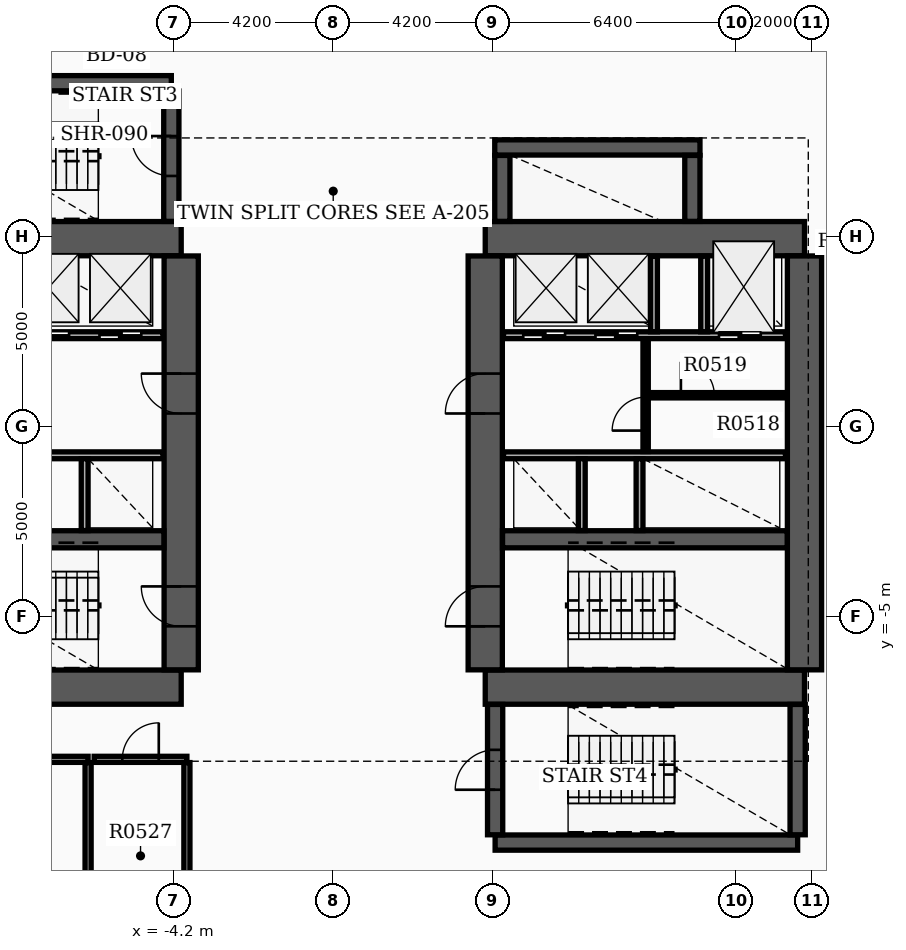
"""IFC4 building model, lengths in metres.
Left out: names, types, materials, properties, quantities, classifications, styles, units other than length and angle.
Written with IfcOpenShell. Run it as: python <this file> out.ifc"""

import sys

from ifc_helpers import new_model, si_unit, direction, frame, frame_2d, origin, place, context, subcontext, project, spatial, rectangle, extrude, element, fill, save


model = new_model("IFC4")
c1 = context("Model", 3, precision=1e-05, world=origin(), true_north=direction((0.0, 1.0)))
c2 = subcontext(c1, "Body", "Model", "MODEL_VIEW")
j1 = project(units=[si_unit("LENGTHUNIT", "METRE"), si_unit("PLANEANGLEUNIT", "RADIAN")], contexts=[c1])
p1 = place(None, origin())
s1 = spatial("IfcSite", under=j1, at=p1, CompositionType="ELEMENT")
p2 = place(p1, origin())
s2 = spatial("IfcBuilding", under=s1, at=p2, CompositionType="ELEMENT")
p3 = place(p2, frame((0.0, 0.0, 35.4)))
s3 = spatial("IfcBuildingStorey", under=s2, at=p3, CompositionType="ELEMENT", Elevation=35.4)
for number, where, z_axis, x_axis in (
    (1, (-12.4, -6.85, 0.0), (0.0, 0.0, 1.0), (1.0, 0.0, 0.0)),
    (2, (-12.4, 4.95, 0.0), (0.0, 0.0, 1.0), (1.0, 0.0, 0.0)),
):
    element("IfcWall", number, at=place(p3, frame(where, z_axis=z_axis, x_axis=x_axis)), inside=s3, PredefinedType="SHEAR", context=c2, shape_type="SweptSolid", body=[
        extrude(rectangle(XDim=8.4, YDim=0.9, at=frame_2d((4.2, 0.0))), origin(), (0.0, 0.0, 1.0), 3.7),
    ])
p4 = place(p3, frame((-4.0, -6.395, 0.0), z_axis=(0.0, 0.0, 1.0), x_axis=(0.0, 1.0, 0.0)))
e3 = element("IfcWall", 3, at=p4, inside=s3, PredefinedType="SHEAR", context=c2, shape_type="SweptSolid", body=[
    extrude(rectangle(XDim=10.89, YDim=0.9, at=frame_2d((5.445, 0.0))), origin(), (0.0, 0.0, 1.0), 3.7),
])
p5 = place(p4, frame((1.145, 0.0, 0.0)))
e4 = element("IfcOpeningElement", 4, at=p5, cuts=e3, PredefinedType="OPENING", context=c2, shape_type="SweptSolid", body=[
    extrude(rectangle(XDim=1.05, YDim=2.15, at=frame_2d((0.525, 1.075))), frame((0.0, 0.46, 0.0), z_axis=(0.0, -1.0, 0.0), x_axis=(1.0, 0.0, 0.0)), (0.0, 0.0, 1.0), 0.92),
])
p6 = place(p4, frame((6.745, 0.0, 0.0)))
e5 = element("IfcOpeningElement", 5, at=p6, cuts=e3, PredefinedType="OPENING", context=c2, shape_type="SweptSolid", body=[
    extrude(rectangle(XDim=1.05, YDim=2.15, at=frame_2d((0.525, 1.075))), frame((0.0, 0.46, 0.0), z_axis=(0.0, -1.0, 0.0), x_axis=(1.0, 0.0, 0.0)), (0.0, 0.0, 1.0), 0.92),
])
p7 = place(p3, frame((-11.945, -2.96, 0.0), z_axis=(0.0, 0.0, 1.0), x_axis=(1.0, 0.0, 0.0)))
e6 = element("IfcWall", 6, at=p7, inside=s3, PredefinedType="SHEAR", context=c2, shape_type="SweptSolid", body=[
    extrude(rectangle(XDim=7.49, YDim=0.45, at=frame_2d((3.745, 0.0))), origin(), (0.0, 0.0, 1.0), 3.7),
])
for number, where, z_axis, x_axis in (
    (7, (4.0, -6.85, 0.0), (0.0, 0.0, 1.0), (1.0, 0.0, 0.0)),
    (8, (4.0, 4.95, 0.0), (0.0, 0.0, 1.0), (1.0, 0.0, 0.0)),
):
    element("IfcWall", number, at=place(p3, frame(where, z_axis=z_axis, x_axis=x_axis)), inside=s3, PredefinedType="SHEAR", context=c2, shape_type="SweptSolid", body=[
        extrude(rectangle(XDim=8.4, YDim=0.9, at=frame_2d((4.2, 0.0))), origin(), (0.0, 0.0, 1.0), 3.7),
    ])
p8 = place(p3, frame((4.0, -6.395, 0.0), z_axis=(0.0, 0.0, 1.0), x_axis=(0.0, 1.0, 0.0)))
e9 = element("IfcWall", 9, at=p8, inside=s3, PredefinedType="SHEAR", context=c2, shape_type="SweptSolid", body=[
    extrude(rectangle(XDim=10.89, YDim=0.9, at=frame_2d((5.445, 0.0))), origin(), (0.0, 0.0, 1.0), 3.7),
])
p9 = place(p8, frame((1.145, 0.0, 0.0)))
e10 = element("IfcOpeningElement", 10, at=p9, cuts=e9, PredefinedType="OPENING", context=c2, shape_type="SweptSolid", body=[
    extrude(rectangle(XDim=1.05, YDim=2.15, at=frame_2d((0.525, 1.075))), frame((0.0, 0.46, 0.0), z_axis=(0.0, -1.0, 0.0), x_axis=(1.0, 0.0, 0.0)), (0.0, 0.0, 1.0), 0.92),
])
p10 = place(p8, frame((6.745, 0.0, 0.0)))
e11 = element("IfcOpeningElement", 11, at=p10, cuts=e9, PredefinedType="OPENING", context=c2, shape_type="SweptSolid", body=[
    extrude(rectangle(XDim=1.05, YDim=2.15, at=frame_2d((0.525, 1.075))), frame((0.0, 0.46, 0.0), z_axis=(0.0, -1.0, 0.0), x_axis=(1.0, 0.0, 0.0)), (0.0, 0.0, 1.0), 0.92),
])
p11 = place(p3, frame((12.4, -6.395, 0.0), z_axis=(0.0, 0.0, 1.0), x_axis=(0.0, 1.0, 0.0)))
e12 = element("IfcWall", 12, at=p11, inside=s3, PredefinedType="SHEAR", context=c2, shape_type="SweptSolid", body=[
    extrude(rectangle(XDim=10.89, YDim=0.9, at=frame_2d((5.445, 0.0))), origin(), (0.0, 0.0, 1.0), 3.7),
])
p12 = place(p3, frame((4.455, -2.96, 0.0), z_axis=(0.0, 0.0, 1.0), x_axis=(1.0, 0.0, 0.0)))
e13 = element("IfcWall", 13, at=p12, inside=s3, PredefinedType="SHEAR", context=c2, shape_type="SweptSolid", body=[
    extrude(rectangle(XDim=7.49, YDim=0.45, at=frame_2d((3.745, 0.0))), origin(), (0.0, 0.0, 1.0), 3.7),
])
p13 = place(p3, frame((-12.22, 9.04, 0.0), z_axis=(0.0, 0.0, 1.0), x_axis=(1.0, 0.0, 0.0)))
e14 = element("IfcWall", 14, at=p13, inside=s3, PredefinedType="SHEAR", context=c2, shape_type="SweptSolid", body=[
    extrude(rectangle(XDim=7.96, YDim=0.4, at=frame_2d((3.98, 0.0))), origin(), (0.0, 0.0, 1.0), 3.7),
])
p14 = place(p3, frame((-4.26, 5.405, 0.0), z_axis=(0.0, 0.0, 1.0), x_axis=(0.0, 1.0, 0.0)))
e15 = element("IfcWall", 15, at=p14, inside=s3, PredefinedType="SHEAR", context=c2, shape_type="SweptSolid", body=[
    extrude(rectangle(XDim=3.43, YDim=0.4, at=frame_2d((1.715, 0.0))), origin(), (0.0, 0.0, 1.0), 3.7),
])
p15 = place(p14, frame((1.195, 0.0, 0.0)))
e16 = element("IfcOpeningElement", 16, at=p15, cuts=e15, PredefinedType="OPENING", context=c2, shape_type="SweptSolid", body=[
    extrude(rectangle(XDim=1.05, YDim=2.15, at=frame_2d((0.525, 1.075))), frame((0.0, 0.21, 0.0), z_axis=(0.0, -1.0, 0.0), x_axis=(1.0, 0.0, 0.0)), (0.0, 0.0, 1.0), 0.42),
])
p16 = place(p3, frame((4.26, -10.94, 0.0), z_axis=(0.0, 0.0, 1.0), x_axis=(1.0, 0.0, 0.0)))
e17 = element("IfcWall", 17, at=p16, inside=s3, PredefinedType="SHEAR", context=c2, shape_type="SweptSolid", body=[
    extrude(rectangle(XDim=7.96, YDim=0.4, at=frame_2d((3.98, 0.0))), origin(), (0.0, 0.0, 1.0), 3.7),
])
p17 = place(p3, frame((4.26, -10.735, 0.0), z_axis=(0.0, 0.0, 1.0), x_axis=(0.0, 1.0, 0.0)))
e18 = element("IfcWall", 18, at=p17, inside=s3, PredefinedType="SHEAR", context=c2, shape_type="SweptSolid", body=[
    extrude(rectangle(XDim=3.43, YDim=0.4, at=frame_2d((1.715, 0.0))), origin(), (0.0, 0.0, 1.0), 3.7),
])
p18 = place(p17, frame((1.185, 0.0, 0.0)))
e19 = element("IfcOpeningElement", 19, at=p18, cuts=e18, PredefinedType="OPENING", context=c2, shape_type="SweptSolid", body=[
    extrude(rectangle(XDim=1.05, YDim=2.15, at=frame_2d((0.525, 1.075))), frame((0.0, 0.21, 0.0), z_axis=(0.0, -1.0, 0.0), x_axis=(1.0, 0.0, 0.0)), (0.0, 0.0, 1.0), 0.42),
])
p19 = place(p3, frame((12.22, -10.735, 0.0), z_axis=(0.0, 0.0, 1.0), x_axis=(0.0, 1.0, 0.0)))
e20 = element("IfcWall", 20, at=p19, inside=s3, PredefinedType="SHEAR", context=c2, shape_type="SweptSolid", body=[
    extrude(rectangle(XDim=3.43, YDim=0.4, at=frame_2d((1.715, 0.0))), origin(), (0.0, 0.0, 1.0), 3.7),
])
p20 = place(p3, frame((4.45, 5.405, 0.0), z_axis=(0.0, 0.0, 1.0), x_axis=(0.0, 1.0, 0.0)))
e21 = element("IfcWall", 21, at=p20, inside=s3, PredefinedType="SHEAR", context=c2, shape_type="SweptSolid", body=[
    extrude(rectangle(XDim=1.735, YDim=0.4, at=frame_2d((0.867, 0.0))), origin(), (0.0, 0.0, 1.0), 3.7),
])
p21 = place(p3, frame((4.25, 7.35, 0.0), z_axis=(0.0, 0.0, 1.0), x_axis=(1.0, 0.0, 0.0)))
e22 = element("IfcWall", 22, at=p21, inside=s3, PredefinedType="SHEAR", context=c2, shape_type="SweptSolid", body=[
    extrude(rectangle(XDim=5.4, YDim=0.4, at=frame_2d((2.7, 0.0))), origin(), (0.0, 0.0, 1.0), 3.7),
])
p22 = place(p3, frame((9.45, 5.405, 0.0), z_axis=(0.0, 0.0, 1.0), x_axis=(0.0, 1.0, 0.0)))
e23 = element("IfcWall", 23, at=p22, inside=s3, PredefinedType="SHEAR", context=c2, shape_type="SweptSolid", body=[
    extrude(rectangle(XDim=1.735, YDim=0.4, at=frame_2d((0.867, 0.0))), origin(), (0.0, 0.0, 1.0), 3.7),
])
p23 = place(p3, frame((-11.9, 2.41, 0.0), z_axis=(0.0, 0.0, 1.0), x_axis=(1.0, 0.0, 0.0)))
e24 = element("IfcWall", 24, at=p23, inside=s3, PredefinedType="SOLIDWALL", context=c2, shape_type="SweptSolid", body=[
    extrude(rectangle(XDim=7.42, YDim=0.18, at=frame_2d((3.71, 0.0))), origin(), (0.0, 0.0, 1.0), 2.9),
])
p24 = place(p23, frame((0.55, 0.0, 0.0)))
e25 = element("IfcOpeningElement", 25, at=p24, cuts=e24, PredefinedType="OPENING", context=c2, shape_type="SweptSolid", body=[
    extrude(rectangle(XDim=1.1, YDim=2.15, at=frame_2d((0.55, 1.075))), frame((0.0, 0.1, 0.0), z_axis=(0.0, -1.0, 0.0), x_axis=(1.0, 0.0, 0.0)), (0.0, 0.0, 1.0), 0.2),
])
p25 = place(p23, frame((3.85, 0.0, 0.0)))
e26 = element("IfcOpeningElement", 26, at=p25, cuts=e24, PredefinedType="OPENING", context=c2, shape_type="SweptSolid", body=[
    extrude(rectangle(XDim=1.1, YDim=2.15, at=frame_2d((0.55, 1.075))), frame((0.0, 0.1, 0.0), z_axis=(0.0, -1.0, 0.0), x_axis=(1.0, 0.0, 0.0)), (0.0, 0.0, 1.0), 0.2),
])
p26 = place(p23, frame((5.75, 0.0, 0.0)))
e27 = element("IfcOpeningElement", 27, at=p26, cuts=e24, PredefinedType="OPENING", context=c2, shape_type="SweptSolid", body=[
    extrude(rectangle(XDim=1.1, YDim=2.15, at=frame_2d((0.55, 1.075))), frame((0.0, 0.1, 0.0), z_axis=(0.0, -1.0, 0.0), x_axis=(1.0, 0.0, 0.0)), (0.0, 0.0, 1.0), 0.2),
])
p27 = place(p3, frame((4.48, 2.41, 0.0), z_axis=(0.0, 0.0, 1.0), x_axis=(1.0, 0.0, 0.0)))
e28 = element("IfcWall", 28, at=p27, inside=s3, PredefinedType="SOLIDWALL", context=c2, shape_type="SweptSolid", body=[
    extrude(rectangle(XDim=7.42, YDim=0.18, at=frame_2d((3.71, 0.0))), origin(), (0.0, 0.0, 1.0), 2.9),
])
p28 = place(p27, frame((5.67, 0.0, 0.0)))
e29 = element("IfcOpeningElement", 29, at=p28, cuts=e28, PredefinedType="OPENING", context=c2, shape_type="SweptSolid", body=[
    extrude(rectangle(XDim=1.1, YDim=2.15, at=frame_2d((0.55, 1.075))), frame((0.0, 0.1, 0.0), z_axis=(0.0, -1.0, 0.0), x_axis=(1.0, 0.0, 0.0)), (0.0, 0.0, 1.0), 0.2),
])
p29 = place(p27, frame((0.52, 0.0, 0.0)))
e30 = element("IfcOpeningElement", 30, at=p29, cuts=e28, PredefinedType="OPENING", context=c2, shape_type="SweptSolid", body=[
    extrude(rectangle(XDim=1.1, YDim=2.15, at=frame_2d((0.55, 1.075))), frame((0.0, 0.1, 0.0), z_axis=(0.0, -1.0, 0.0), x_axis=(1.0, 0.0, 0.0)), (0.0, 0.0, 1.0), 0.2),
])
p30 = place(p27, frame((2.42, 0.0, 0.0)))
e31 = element("IfcOpeningElement", 31, at=p30, cuts=e28, PredefinedType="OPENING", context=c2, shape_type="SweptSolid", body=[
    extrude(rectangle(XDim=1.1, YDim=2.15, at=frame_2d((0.55, 1.075))), frame((0.0, 0.1, 0.0), z_axis=(0.0, -1.0, 0.0), x_axis=(1.0, 0.0, 0.0)), (0.0, 0.0, 1.0), 0.2),
])
for number, where, z_axis, x_axis in (
    (32, (-11.9, -0.75, 0.0), (0.0, 0.0, 1.0), (1.0, 0.0, 0.0)),
    (33, (4.48, -0.75, 0.0), (0.0, 0.0, 1.0), (1.0, 0.0, 0.0)),
):
    element("IfcWall", number, at=place(p3, frame(where, z_axis=z_axis, x_axis=x_axis)), inside=s3, PredefinedType="SOLIDWALL", context=c2, shape_type="SweptSolid", body=[
        extrude(rectangle(XDim=7.42, YDim=0.18, at=frame_2d((3.71, 0.0))), origin(), (0.0, 0.0, 1.0), 2.9),
    ])
for number, where, z_axis, x_axis in (
    (34, (8.44, 2.5, 0.0), (0.0, 0.0, 1.0), (0.0, 1.0, 0.0)),
    (35, (9.76, 2.5, 0.0), (0.0, 0.0, 1.0), (0.0, 1.0, 0.0)),
):
    element("IfcWall", number, at=place(p3, frame(where, z_axis=z_axis, x_axis=x_axis)), inside=s3, PredefinedType="SOLIDWALL", context=c2, shape_type="SweptSolid", body=[
        extrude(rectangle(XDim=1.99, YDim=0.18, at=frame_2d((0.995, 0.0))), origin(), (0.0, 0.0, 1.0), 2.9),
    ])
for number, where, z_axis, x_axis in (
    (36, (-6.54, -2.73, 0.0), (0.0, 0.0, 1.0), (0.0, 1.0, 0.0)),
    (37, (6.54, -2.73, 0.0), (0.0, 0.0, 1.0), (0.0, 1.0, 0.0)),
    (38, (8.06, -2.73, 0.0), (0.0, 0.0, 1.0), (0.0, 1.0, 0.0)),
):
    element("IfcWall", number, at=place(p3, frame(where, z_axis=z_axis, x_axis=x_axis)), inside=s3, PredefinedType="SOLIDWALL", context=c2, shape_type="SweptSolid", body=[
        extrude(rectangle(XDim=1.89, YDim=0.18, at=frame_2d((0.945, 0.0))), origin(), (0.0, 0.0, 1.0), 2.9),
    ])
p31 = place(p3, frame((8.22, -0.65, 0.0), z_axis=(0.0, 0.0, 1.0), x_axis=(0.0, 1.0, 0.0)))
e39 = element("IfcWall", 39, at=p31, inside=s3, PredefinedType="SOLIDWALL", context=c2, shape_type="SweptSolid", body=[
    extrude(rectangle(XDim=2.96, YDim=0.14, at=frame_2d((1.48, 0.0))), origin(), (0.0, 0.0, 1.0), 2.9),
])
p32 = place(p31, frame((0.55, 0.0, 0.0)))
e40 = element("IfcOpeningElement", 40, at=p32, cuts=e39, PredefinedType="OPENING", context=c2, shape_type="SweptSolid", body=[
    extrude(rectangle(XDim=0.88, YDim=2.1, at=frame_2d((0.44, 1.05))), frame((0.0, 0.08, 0.0), z_axis=(0.0, -1.0, 0.0), x_axis=(1.0, 0.0, 0.0)), (0.0, 0.0, 1.0), 0.16),
])
p33 = place(p3, frame((8.298, 0.83, 0.0), z_axis=(0.0, 0.0, 1.0), x_axis=(1.0, 0.0, 0.0)))
e41 = element("IfcWall", 41, at=p33, inside=s3, PredefinedType="PARTITIONING", context=c2, shape_type="SweptSolid", body=[
    extrude(rectangle(XDim=3.552, YDim=0.14, at=frame_2d((1.776, 0.0))), origin(), (0.0, 0.0, 1.0), 2.9),
])
p34 = place(p33, frame((0.85, 0.0, 0.0)))
e42 = element("IfcOpeningElement", 42, at=p34, cuts=e41, PredefinedType="OPENING", context=c2, shape_type="SweptSolid", body=[
    extrude(rectangle(XDim=0.88, YDim=2.1, at=frame_2d((0.44, 1.05))), frame((0.0, 0.08, 0.0), z_axis=(0.0, -1.0, 0.0), x_axis=(1.0, 0.0, 0.0)), (0.0, 0.0, 1.0), 0.16),
])
p35 = place(p3, frame((-12.4, -8.75, 0.0), z_axis=(0.0, 0.0, 1.0), x_axis=(1.0, 0.0, 0.0)))
e43 = element("IfcWall", 43, at=p35, inside=s3, PredefinedType="PARTITIONING", context=c2, shape_type="SweptSolid", body=[
    extrude(rectangle(XDim=5.95, YDim=0.16, at=frame_2d((2.975, 0.0))), origin(), (0.0, 0.0, 1.0), 2.9),
])
p36 = place(p35, frame((2.495, 0.0, 0.0)))
e44 = element("IfcOpeningElement", 44, at=p36, cuts=e43, PredefinedType="OPENING", context=c2, shape_type="SweptSolid", body=[
    extrude(rectangle(XDim=0.96, YDim=2.15, at=frame_2d((0.48, 1.075))), frame((0.0, 0.09, 0.0), z_axis=(0.0, -1.0, 0.0), x_axis=(1.0, 0.0, 0.0)), (0.0, 0.0, 1.0), 0.18),
])
p37 = place(p3, frame((-6.45, -13.065, 0.0), z_axis=(0.0, 0.0, 1.0), x_axis=(0.0, 1.0, 0.0)))
e45 = element("IfcWall", 45, at=p37, inside=s3, PredefinedType="PARTITIONING", context=c2, shape_type="SweptSolid", body=[
    extrude(rectangle(XDim=4.23, YDim=0.16, at=frame_2d((2.115, 0.0))), origin(), (0.0, 0.0, 1.0), 2.9),
])
p38 = place(p3, frame((-6.29, -8.75, 0.0), z_axis=(0.0, 0.0, 1.0), x_axis=(1.0, 0.0, 0.0)))
e46 = element("IfcWall", 46, at=p38, inside=s3, PredefinedType="PARTITIONING", context=c2, shape_type="SweptSolid", body=[
    extrude(rectangle(XDim=2.44, YDim=0.16, at=frame_2d((1.22, 0.0))), origin(), (0.0, 0.0, 1.0), 2.9),
])
p39 = place(p38, frame((0.74, 0.0, 0.0)))
e47 = element("IfcOpeningElement", 47, at=p39, cuts=e46, PredefinedType="OPENING", context=c2, shape_type="SweptSolid", body=[
    extrude(rectangle(XDim=0.96, YDim=2.15, at=frame_2d((0.48, 1.075))), frame((0.0, 0.09, 0.0), z_axis=(0.0, -1.0, 0.0), x_axis=(1.0, 0.0, 0.0)), (0.0, 0.0, 1.0), 0.18),
])
p40 = place(p3, frame((-3.85, -13.065, 0.0), z_axis=(0.0, 0.0, 1.0), x_axis=(0.0, 1.0, 0.0)))
e48 = element("IfcWall", 48, at=p40, inside=s3, PredefinedType="PARTITIONING", context=c2, shape_type="SweptSolid", body=[
    extrude(rectangle(XDim=4.23, YDim=0.16, at=frame_2d((2.115, 0.0))), origin(), (0.0, 0.0, 1.0), 2.9),
])
p41 = place(p5, origin())
e49 = element("IfcDoor", 49, at=p41, inside=s3, OperationType="SINGLE_SWING_RIGHT", PredefinedType="DOOR", context=c2, shape_type="SweptSolid", body=[
    extrude(rectangle(XDim=1.05, YDim=2.15, at=frame_2d((0.525, 1.075))), frame((0.0, 0.025, 0.0), z_axis=(0.0, -1.0, 0.0), x_axis=(1.0, 0.0, 0.0)), (0.0, 0.0, 1.0), 0.05),
])
fill(e4, e49)
p42 = place(p9, origin())
e50 = element("IfcDoor", 50, at=p42, inside=s3, OperationType="SINGLE_SWING_LEFT", PredefinedType="DOOR", context=c2, shape_type="SweptSolid", body=[
    extrude(rectangle(XDim=1.05, YDim=2.15, at=frame_2d((0.525, 1.075))), frame((0.0, 0.025, 0.0), z_axis=(0.0, -1.0, 0.0), x_axis=(1.0, 0.0, 0.0)), (0.0, 0.0, 1.0), 0.05),
])
fill(e10, e50)
p43 = place(p6, origin())
e51 = element("IfcDoor", 51, at=p43, inside=s3, OperationType="SINGLE_SWING_RIGHT", PredefinedType="DOOR", context=c2, shape_type="SweptSolid", body=[
    extrude(rectangle(XDim=1.05, YDim=2.15, at=frame_2d((0.525, 1.075))), frame((0.0, 0.025, 0.0), z_axis=(0.0, -1.0, 0.0), x_axis=(1.0, 0.0, 0.0)), (0.0, 0.0, 1.0), 0.05),
])
fill(e5, e51)
p44 = place(p10, origin())
e52 = element("IfcDoor", 52, at=p44, inside=s3, OperationType="SINGLE_SWING_LEFT", PredefinedType="DOOR", context=c2, shape_type="SweptSolid", body=[
    extrude(rectangle(XDim=1.05, YDim=2.15, at=frame_2d((0.525, 1.075))), frame((0.0, 0.025, 0.0), z_axis=(0.0, -1.0, 0.0), x_axis=(1.0, 0.0, 0.0)), (0.0, 0.0, 1.0), 0.05),
])
fill(e11, e52)
p45 = place(p15, origin())
e53 = element("IfcDoor", 53, at=p45, inside=s3, OperationType="SINGLE_SWING_RIGHT", PredefinedType="DOOR", context=c2, shape_type="SweptSolid", body=[
    extrude(rectangle(XDim=1.05, YDim=2.15, at=frame_2d((0.525, 1.075))), frame((0.0, 0.025, 0.0), z_axis=(0.0, -1.0, 0.0), x_axis=(1.0, 0.0, 0.0)), (0.0, 0.0, 1.0), 0.05),
])
fill(e16, e53)
p46 = place(p18, origin())
e54 = element("IfcDoor", 54, at=p46, inside=s3, OperationType="SINGLE_SWING_LEFT", PredefinedType="DOOR", context=c2, shape_type="SweptSolid", body=[
    extrude(rectangle(XDim=1.05, YDim=2.15, at=frame_2d((0.525, 1.075))), frame((0.0, 0.025, 0.0), z_axis=(0.0, -1.0, 0.0), x_axis=(1.0, 0.0, 0.0)), (0.0, 0.0, 1.0), 0.05),
])
fill(e19, e54)
p47 = place(p28, origin())
e55 = element("IfcDoor", 55, at=p47, inside=s3, OperationType="DOUBLE_DOOR_SLIDING", PredefinedType="DOOR", context=c2, shape_type="SweptSolid", body=[
    extrude(rectangle(XDim=1.1, YDim=2.15, at=frame_2d((0.55, 1.075))), frame((0.0, 0.025, 0.0), z_axis=(0.0, -1.0, 0.0), x_axis=(1.0, 0.0, 0.0)), (0.0, 0.0, 1.0), 0.05),
])
fill(e29, e55)
p48 = place(p25, origin())
e56 = element("IfcDoor", 56, at=p48, inside=s3, OperationType="DOUBLE_DOOR_SLIDING", PredefinedType="DOOR", context=c2, shape_type="SweptSolid", body=[
    extrude(rectangle(XDim=1.1, YDim=2.15, at=frame_2d((0.55, 1.075))), frame((0.0, 0.025, 0.0), z_axis=(0.0, -1.0, 0.0), x_axis=(1.0, 0.0, 0.0)), (0.0, 0.0, 1.0), 0.05),
])
fill(e26, e56)
p49 = place(p26, origin())
e57 = element("IfcDoor", 57, at=p49, inside=s3, OperationType="DOUBLE_DOOR_SLIDING", PredefinedType="DOOR", context=c2, shape_type="SweptSolid", body=[
    extrude(rectangle(XDim=1.1, YDim=2.15, at=frame_2d((0.55, 1.075))), frame((0.0, 0.025, 0.0), z_axis=(0.0, -1.0, 0.0), x_axis=(1.0, 0.0, 0.0)), (0.0, 0.0, 1.0), 0.05),
])
fill(e27, e57)
p50 = place(p29, origin())
e58 = element("IfcDoor", 58, at=p50, inside=s3, OperationType="DOUBLE_DOOR_SLIDING", PredefinedType="DOOR", context=c2, shape_type="SweptSolid", body=[
    extrude(rectangle(XDim=1.1, YDim=2.15, at=frame_2d((0.55, 1.075))), frame((0.0, 0.025, 0.0), z_axis=(0.0, -1.0, 0.0), x_axis=(1.0, 0.0, 0.0)), (0.0, 0.0, 1.0), 0.05),
])
fill(e30, e58)
p51 = place(p30, origin())
e59 = element("IfcDoor", 59, at=p51, inside=s3, OperationType="DOUBLE_DOOR_SLIDING", PredefinedType="DOOR", context=c2, shape_type="SweptSolid", body=[
    extrude(rectangle(XDim=1.1, YDim=2.15, at=frame_2d((0.55, 1.075))), frame((0.0, 0.025, 0.0), z_axis=(0.0, -1.0, 0.0), x_axis=(1.0, 0.0, 0.0)), (0.0, 0.0, 1.0), 0.05),
])
fill(e31, e59)
p52 = place(p32, origin())
e60 = element("IfcDoor", 60, at=p52, inside=s3, OperationType="SINGLE_SWING_LEFT", PredefinedType="DOOR", context=c2, shape_type="SweptSolid", body=[
    extrude(rectangle(XDim=0.88, YDim=2.1, at=frame_2d((0.44, 1.05))), frame((0.0, 0.025, 0.0), z_axis=(0.0, -1.0, 0.0), x_axis=(1.0, 0.0, 0.0)), (0.0, 0.0, 1.0), 0.05),
])
fill(e40, e60)
p53 = place(p34, origin())
e61 = element("IfcDoor", 61, at=p53, inside=s3, OperationType="SINGLE_SWING_LEFT", PredefinedType="DOOR", context=c2, shape_type="SweptSolid", body=[
    extrude(rectangle(XDim=0.88, YDim=2.1, at=frame_2d((0.44, 1.05))), frame((0.0, 0.025, 0.0), z_axis=(0.0, -1.0, 0.0), x_axis=(1.0, 0.0, 0.0)), (0.0, 0.0, 1.0), 0.05),
])
fill(e42, e61)
p54 = place(p39, origin())
e62 = element("IfcDoor", 62, at=p54, inside=s3, OperationType="SINGLE_SWING_RIGHT", PredefinedType="DOOR", context=c2, shape_type="SweptSolid", body=[
    extrude(rectangle(XDim=0.96, YDim=2.15, at=frame_2d((0.48, 1.075))), frame((0.0, 0.025, 0.0), z_axis=(0.0, -1.0, 0.0), x_axis=(1.0, 0.0, 0.0)), (0.0, 0.0, 1.0), 0.05),
])
fill(e47, e62)
save(model, sys.argv[1])
